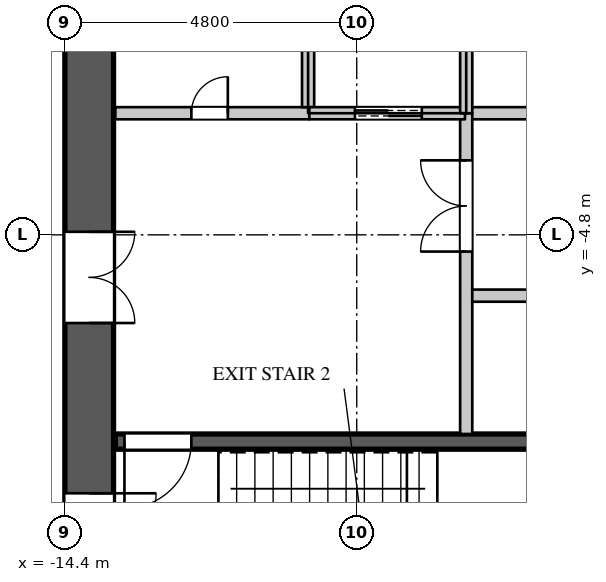
"""IFC4 building model, lengths in metres.
Left out: names, types, materials, properties, quantities, classifications, styles, units other than length and angle.
Written with IfcOpenShell. Run it as: python <this file> out.ifc"""

import sys

from ifc_helpers import new_model, si_unit, direction, frame, frame_2d, origin, place, context, subcontext, project, spatial, rectangle, extrude, element, fill, save


model = new_model("IFC4")
c1 = context("Model", 3, precision=1e-05, world=origin(), true_north=direction((0.0, 1.0)))
c2 = subcontext(c1, "Body", "Model", "MODEL_VIEW")
j1 = project(units=[si_unit("LENGTHUNIT", "METRE"), si_unit("PLANEANGLEUNIT", "RADIAN")], contexts=[c1])
p1 = place(None, origin())
s1 = spatial("IfcSite", under=j1, at=p1, CompositionType="ELEMENT")
p2 = place(p1, origin())
s2 = spatial("IfcBuilding", under=s1, at=p2, CompositionType="ELEMENT")
p3 = place(p2, frame((0.0, 0.0, 106.5)))
s3 = spatial("IfcBuildingStorey", under=s2, at=p3, CompositionType="ELEMENT", Elevation=106.5)
p4 = place(p3, frame((-14.0, -11.2, 0.0), z_axis=(0.0, 0.0, 1.0), x_axis=(0.0, 1.0, 0.0)))
e1 = element("IfcWall", 1, at=p4, inside=s3, PredefinedType="SHEAR", context=c2, shape_type="SweptSolid", body=[
    extrude(rectangle(XDim=22.4, YDim=0.8, at=frame_2d((11.2, 0.0))), origin(), (0.0, 0.0, 1.0), 4.2),
])
p5 = place(p4, frame((20.25, 0.0, 0.0)))
e2 = element("IfcOpeningElement", 2, at=p5, cuts=e1, PredefinedType="OPENING", context=c2, shape_type="SweptSolid", body=[
    extrude(rectangle(XDim=1.1, YDim=2.2, at=frame_2d((0.55, 1.1))), frame((0.0, 0.41, 0.0), z_axis=(0.0, -1.0, 0.0), x_axis=(1.0, 0.0, 0.0)), (0.0, 0.0, 1.0), 0.82),
])
p6 = place(p4, frame((1.05, 0.0, 0.0)))
e3 = element("IfcOpeningElement", 3, at=p6, cuts=e1, PredefinedType="OPENING", context=c2, shape_type="SweptSolid", body=[
    extrude(rectangle(XDim=1.1, YDim=2.2, at=frame_2d((0.55, 1.1))), frame((0.0, 0.41, 0.0), z_axis=(0.0, -1.0, 0.0), x_axis=(1.0, 0.0, 0.0)), (0.0, 0.0, 1.0), 0.82),
])
p7 = place(p4, frame((15.95, 0.0, 0.0)))
e4 = element("IfcOpeningElement", 4, at=p7, cuts=e1, PredefinedType="OPENING", context=c2, shape_type="SweptSolid", body=[
    extrude(rectangle(XDim=1.5, YDim=2.4, at=frame_2d((0.75, 1.2))), frame((0.0, 0.41, 0.0), z_axis=(0.0, -1.0, 0.0), x_axis=(1.0, 0.0, 0.0)), (0.0, 0.0, 1.0), 0.82),
])
p8 = place(p4, frame((4.95, 0.0, 0.0)))
e5 = element("IfcOpeningElement", 5, at=p8, cuts=e1, PredefinedType="OPENING", context=c2, shape_type="SweptSolid", body=[
    extrude(rectangle(XDim=1.5, YDim=2.4, at=frame_2d((0.75, 1.2))), frame((0.0, 0.41, 0.0), z_axis=(0.0, -1.0, 0.0), x_axis=(1.0, 0.0, 0.0)), (0.0, 0.0, 1.0), 0.82),
])
p9 = place(p3, frame((-7.82, -2.8, 0.0), z_axis=(0.0, 0.0, 1.0), x_axis=(1.0, 0.0, 0.0)))
e6 = element("IfcWall", 6, at=p9, inside=s3, PredefinedType="PARTITIONING", context=c2, shape_type="SweptSolid", body=[
    extrude(rectangle(XDim=3.24, YDim=0.2, at=frame_2d((1.62, 0.0))), origin(), (0.0, 0.0, 1.0), 3.95),
])
p10 = place(p9, frame((1.15, 0.0, 0.0)))
e7 = element("IfcOpeningElement", 7, at=p10, cuts=e6, PredefinedType="OPENING", context=c2, shape_type="SweptSolid", body=[
    extrude(rectangle(XDim=0.9, YDim=2.2, at=frame_2d((0.45, 1.1))), frame((0.0, 0.11, 0.0), z_axis=(0.0, -1.0, 0.0), x_axis=(1.0, 0.0, 0.0)), (0.0, 0.0, 1.0), 0.22),
])
p11 = place(p3, frame((-7.8, -8.075, 0.0), z_axis=(0.0, 0.0, 1.0), x_axis=(0.0, 1.0, 0.0)))
e8 = element("IfcWall", 8, at=p11, inside=s3, PredefinedType="PARTITIONING", context=c2, shape_type="SweptSolid", body=[
    extrude(rectangle(XDim=5.275, YDim=0.2, at=frame_2d((2.637, 0.0))), origin(), (0.0, 0.0, 1.0), 3.95),
])
p12 = place(p11, frame((3.0, 0.0, 0.0)))
e9 = element("IfcOpeningElement", 9, at=p12, cuts=e8, PredefinedType="OPENING", context=c2, shape_type="SweptSolid", body=[
    extrude(rectangle(XDim=1.5, YDim=2.4, at=frame_2d((0.75, 1.2))), frame((0.0, 0.11, 0.0), z_axis=(0.0, -1.0, 0.0), x_axis=(1.0, 0.0, 0.0)), (0.0, 0.0, 1.0), 0.22),
])
p13 = place(p3, frame((-7.7, -5.8, 0.0), z_axis=(0.0, 0.0, 1.0), x_axis=(1.0, 0.0, 0.0)))
e10 = element("IfcWall", 10, at=p13, inside=s3, PredefinedType="PARTITIONING", context=c2, shape_type="SweptSolid", body=[
    extrude(rectangle(XDim=13.12, YDim=0.2, at=frame_2d((6.56, 0.0))), origin(), (0.0, 0.0, 1.0), 3.95),
])
p14 = place(p13, frame((3.45, 0.0, 0.0)))
e11 = element("IfcOpeningElement", 11, at=p14, cuts=e10, PredefinedType="OPENING", context=c2, shape_type="SweptSolid", body=[
    extrude(rectangle(XDim=0.9, YDim=2.2, at=frame_2d((0.45, 1.1))), frame((0.0, 0.11, 0.0), z_axis=(0.0, -1.0, 0.0), x_axis=(1.0, 0.0, 0.0)), (0.0, 0.0, 1.0), 0.22),
])
p15 = place(p13, frame((9.85, 0.0, 0.0)))
e12 = element("IfcOpeningElement", 12, at=p15, cuts=e10, PredefinedType="OPENING", context=c2, shape_type="SweptSolid", body=[
    extrude(rectangle(XDim=0.9, YDim=2.2, at=frame_2d((0.45, 1.1))), frame((0.0, 0.11, 0.0), z_axis=(0.0, -1.0, 0.0), x_axis=(1.0, 0.0, 0.0)), (0.0, 0.0, 1.0), 0.22),
])
p16 = place(p3, frame((-13.57, -2.8, 0.0), z_axis=(0.0, 0.0, 1.0), x_axis=(1.0, 0.0, 0.0)))
e13 = element("IfcWall", 13, at=p16, inside=s3, PredefinedType="PARTITIONING", context=c2, shape_type="SweptSolid", body=[
    extrude(rectangle(XDim=3.19, YDim=0.2, at=frame_2d((1.595, 0.0))), origin(), (0.0, 0.0, 1.0), 3.95),
])
p17 = place(p16, frame((1.25, 0.0, 0.0)))
e14 = element("IfcOpeningElement", 14, at=p17, cuts=e13, PredefinedType="OPENING", context=c2, shape_type="SweptSolid", body=[
    extrude(rectangle(XDim=0.6, YDim=2.0, at=frame_2d((0.3, 1.0))), frame((0.0, 0.11, 0.0), z_axis=(0.0, -1.0, 0.0), x_axis=(1.0, 0.0, 0.0)), (0.0, 0.0, 1.0), 0.22),
])
p18 = place(p3, frame((-10.4, -2.7, 0.0), z_axis=(0.0, 0.0, 1.0), x_axis=(0.0, 1.0, 0.0)))
e15 = element("IfcWall", 15, at=p18, inside=s3, PredefinedType="PARTITIONING", context=c2, shape_type="SweptSolid", body=[
    extrude(rectangle(XDim=2.7, YDim=0.2, at=frame_2d((1.35, 0.0))), origin(), (0.0, 0.0, 1.0), 3.95),
])
p19 = place(p3, frame((-10.38, -2.8, 0.0), z_axis=(0.0, 0.0, 1.0), x_axis=(1.0, 0.0, 0.0)))
e16 = element("IfcWall", 16, at=p19, inside=s3, PredefinedType="PARTITIONING", context=c2, shape_type="SweptSolid", body=[
    extrude(rectangle(XDim=2.56, YDim=0.2, at=frame_2d((1.28, 0.0))), origin(), (0.0, 0.0, 1.0), 3.95),
])
p20 = place(p19, frame((0.75, 0.0, 0.0)))
e17 = element("IfcOpeningElement", 17, at=p20, cuts=e16, PredefinedType="OPENING", context=c2, shape_type="SweptSolid", body=[
    extrude(rectangle(XDim=1.1, YDim=2.2, at=frame_2d((0.55, 1.1))), frame((0.0, 0.11, 0.0), z_axis=(0.0, -1.0, 0.0), x_axis=(1.0, 0.0, 0.0)), (0.0, 0.0, 1.0), 0.22),
])
p21 = place(p3, frame((-7.8, -2.8, 0.0), z_axis=(0.0, 0.0, 1.0), x_axis=(0.0, 1.0, 0.0)))
e18 = element("IfcWall", 18, at=p21, inside=s3, PredefinedType="PARTITIONING", context=c2, shape_type="SweptSolid", body=[
    extrude(rectangle(XDim=2.8, YDim=0.2, at=frame_2d((1.4, 0.0))), origin(), (0.0, 0.0, 1.0), 3.95),
])
p22 = place(p3, frame((-13.57, -8.2, 0.0), z_axis=(0.0, 0.0, 1.0), x_axis=(1.0, 0.0, 0.0)))
e19 = element("IfcWall", 19, at=p22, inside=s3, PredefinedType="SHEAR", context=c2, shape_type="SweptSolid", body=[
    extrude(rectangle(XDim=8.295, YDim=0.25, at=frame_2d((4.147, 0.0))), origin(), (0.0, 0.0, 1.0), 3.95),
])
p23 = place(p22, frame((0.15, 0.0, 0.0)))
e20 = element("IfcOpeningElement", 20, at=p23, cuts=e19, PredefinedType="OPENING", context=c2, shape_type="SweptSolid", body=[
    extrude(rectangle(XDim=1.1, YDim=2.2, at=frame_2d((0.55, 1.1))), frame((0.0, 0.135, 0.0), z_axis=(0.0, -1.0, 0.0), x_axis=(1.0, 0.0, 0.0)), (0.0, 0.0, 1.0), 0.27),
])
p24 = place(p17, origin())
e21 = element("IfcDoor", 21, at=p24, inside=s3, OperationType="SINGLE_SWING_RIGHT", PredefinedType="DOOR", context=c2, shape_type="SweptSolid", body=[
    extrude(rectangle(XDim=0.6, YDim=2.0, at=frame_2d((0.3, 1.0))), frame((0.0, 0.025, 0.0), z_axis=(0.0, -1.0, 0.0), x_axis=(1.0, 0.0, 0.0)), (0.0, 0.0, 1.0), 0.05),
])
fill(e14, e21)
p25 = place(p20, origin())
e22 = element("IfcDoor", 22, at=p25, inside=s3, OperationType="DOUBLE_DOOR_SLIDING", PredefinedType="DOOR", context=c2, shape_type="SweptSolid", body=[
    extrude(rectangle(XDim=1.1, YDim=2.2, at=frame_2d((0.55, 1.1))), frame((0.0, 0.025, 0.0), z_axis=(0.0, -1.0, 0.0), x_axis=(1.0, 0.0, 0.0)), (0.0, 0.0, 1.0), 0.05),
])
fill(e17, e22)
p26 = place(p23, origin())
e23 = element("IfcDoor", 23, at=p26, inside=s3, OperationType="SINGLE_SWING_RIGHT", PredefinedType="DOOR", context=c2, shape_type="SweptSolid", body=[
    extrude(rectangle(XDim=1.1, YDim=2.2, at=frame_2d((0.55, 1.1))), frame((0.0, 0.025, 0.0), z_axis=(0.0, -1.0, 0.0), x_axis=(1.0, 0.0, 0.0)), (0.0, 0.0, 1.0), 0.05),
])
fill(e20, e23)
p27 = place(p12, origin())
e24 = element("IfcDoor", 24, at=p27, inside=s3, OperationType="DOUBLE_DOOR_SINGLE_SWING", PredefinedType="DOOR", context=c2, shape_type="SweptSolid", body=[
    extrude(rectangle(XDim=1.5, YDim=2.4, at=frame_2d((0.75, 1.2))), frame((0.0, 0.025, 0.0), z_axis=(0.0, -1.0, 0.0), x_axis=(1.0, 0.0, 0.0)), (0.0, 0.0, 1.0), 0.05),
])
fill(e9, e24)
p28 = place(p6, origin())
e25 = element("IfcDoor", 25, at=p28, inside=s3, OperationType="SINGLE_SWING_LEFT", PredefinedType="DOOR", context=c2, shape_type="SweptSolid", body=[
    extrude(rectangle(XDim=1.1, YDim=2.2, at=frame_2d((0.55, 1.1))), frame((0.0, -0.345, 0.0), z_axis=(0.0, -1.0, 0.0), x_axis=(1.0, 0.0, 0.0)), (0.0, 0.0, 1.0), 0.05),
])
fill(e3, e25)
p29 = place(p8, origin())
e26 = element("IfcDoor", 26, at=p29, inside=s3, OperationType="DOUBLE_DOOR_SINGLE_SWING", PredefinedType="DOOR", context=c2, shape_type="SweptSolid", body=[
    extrude(rectangle(XDim=1.5, YDim=2.4, at=frame_2d((0.75, 1.2))), frame((0.0, -0.345, 0.0), z_axis=(0.0, -1.0, 0.0), x_axis=(1.0, 0.0, 0.0)), (0.0, 0.0, 1.0), 0.05),
])
fill(e5, e26)
save(model, sys.argv[1])
